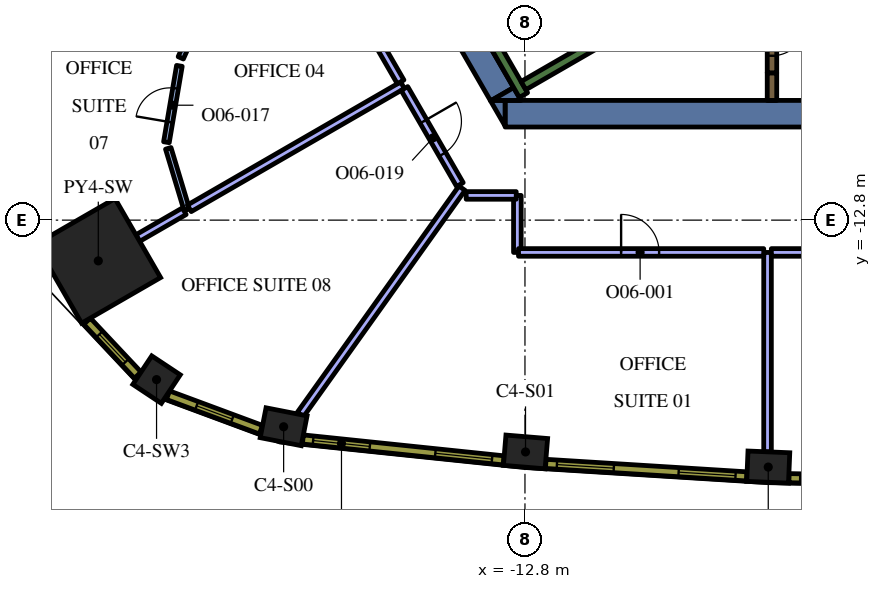
"""IFC4 building model, lengths in metres.
Left out: names, types, materials, properties, quantities, classifications, styles, units other than length and angle.
Written with IfcOpenShell. Run it as: python <this file> out.ifc"""

import sys

from ifc_helpers import new_model, si_unit, direction, frame, frame_2d, origin, origin_2d, place, context, subcontext, project, spatial, polyline, rectangle, outline, extrude, element, fill, save


model = new_model("IFC4")
c1 = context("Model", 3, precision=1e-05, world=origin(), true_north=direction((0.0, 1.0)))
c2 = subcontext(c1, "Body", "Model", "MODEL_VIEW")
j1 = project(units=[si_unit("LENGTHUNIT", "METRE"), si_unit("PLANEANGLEUNIT", "RADIAN")], contexts=[c1])
p1 = place(None, origin())
s1 = spatial("IfcSite", under=j1, at=p1, CompositionType="ELEMENT")
p2 = place(p1, origin())
s2 = spatial("IfcBuilding", under=s1, at=p2, CompositionType="ELEMENT")
p3 = place(p2, frame((0.0, 0.0, 201.6)))
s3 = spatial("IfcBuildingStorey", under=s2, at=p3, CompositionType="ELEMENT", Elevation=201.6)
p4 = place(p3, frame((-24.027, -13.872, 0.0), z_axis=(0.0, 0.0, 1.0), x_axis=(-0.866025403784, -0.5, 0.0)))
e1 = element("IfcColumn", 1, at=p4, inside=s3, PredefinedType="COLUMN", context=c2, shape_type="SweptSolid", body=[
    extrude(rectangle(XDim=2.4, YDim=2.4, at=origin_2d()), origin(), (0.0, 0.0, 1.0), 4.2),
])
for number, where, z_axis, x_axis in (
    (2, (-19.15, -18.237, 0.0), (0.0, 0.0, 1.0), (0.981, -0.192, 0.0)),
    (3, (-12.785, -18.9, 0.0), (0.0, 0.0, 1.0), (0.997, -0.083, 0.0)),
    (4, (-6.398, -19.298, 0.0), (0.0, 0.0, 1.0), (0.999, -0.041, 0.0)),
):
    element("IfcColumn", number, at=place(p3, frame(where, z_axis=z_axis, x_axis=x_axis)), inside=s3, PredefinedType="COLUMN", context=c2, shape_type="SweptSolid", body=[
        extrude(rectangle(XDim=1.1, YDim=0.8, at=origin_2d()), origin(), (0.0, 0.0, 1.0), 4.2),
    ])
p5 = place(p3, frame((-22.494, -16.997, 0.0), z_axis=(0.0, 0.0, 1.0), x_axis=(0.833238868178, -0.552913183563, 0.0)))
e5 = element("IfcColumn", 5, at=p5, inside=s3, PredefinedType="COLUMN", context=c2, shape_type="SweptSolid", body=[
    extrude(rectangle(XDim=0.9, YDim=0.9, at=origin_2d()), origin(), (0.0, 0.0, 1.0), 4.2),
])
p6 = place(p3, frame((8.904, -10.0, 0.0), z_axis=(0.0, 0.0, 1.0), x_axis=(-1.0, 0.0, 0.0)))
e6 = element("IfcWall", 6, at=p6, inside=s3, PredefinedType="SOLIDWALL", context=c2, shape_type="SweptSolid", body=[
    extrude(rectangle(XDim=22.226, YDim=0.7, at=frame_2d((11.113, 0.0))), origin(), (0.0, 0.0, 1.0), 4.2),
])
p7 = place(p3, origin())
e7 = element("IfcWall", 7, at=p7, inside=s3, PredefinedType="SOLIDWALL", context=c2, shape_type="SweptSolid", body=[
    extrude(outline(polyline([(-13.712, -9.65), (-13.324, -9.65), (-13.324, -10.322), (-13.712, -9.65)])), origin(), (0.0, 0.0, 1.0), 4.2),
])
p8 = place(p3, frame((-13.402, -9.487, 0.0), z_axis=(0.0, 0.0, 1.0), x_axis=(-0.500020498207, 0.866013568815, 0.0)))
e8 = element("IfcWall", 8, at=p8, inside=s3, PredefinedType="SOLIDWALL", context=c2, shape_type="SweptSolid", body=[
    extrude(rectangle(XDim=3.829, YDim=0.7, at=frame_2d((1.915, 0.0))), origin(), (0.0, 0.0, 1.0), 4.2),
])
e9 = element("IfcWall", 9, at=p7, inside=s3, PredefinedType="SOLIDWALL", context=c2, shape_type="SweptSolid", body=[
    extrude(outline(polyline([(-12.904, -9.65), (-13.68, -9.65), (-13.098, -9.314), (-12.904, -9.65)])), origin(), (0.0, 0.0, 1.0), 4.2),
])
p9 = place(p3, frame((-12.84, -9.511, 0.0), z_axis=(0.0, 0.0, 1.0), x_axis=(-0.499997733992, 0.866026712061, 0.0)))
e10 = element("IfcWall", 10, at=p9, inside=s3, PredefinedType="SOLIDWALL", context=c2, shape_type="SweptSolid", body=[
    extrude(rectangle(XDim=3.634, YDim=0.25, at=frame_2d((1.817, 0.0))), origin(), (0.0, 0.0, 1.0), 4.2),
])
p10 = place(p3, frame((-12.84, -9.261, 0.0), z_axis=(0.0, 0.0, 1.0), x_axis=(0.866016039709, 0.500016218704, 0.0)))
e11 = element("IfcWall", 11, at=p10, inside=s3, PredefinedType="SOLIDWALL", context=c2, shape_type="SweptSolid", body=[
    extrude(rectangle(XDim=7.05, YDim=0.25, at=frame_2d((3.525, 0.0))), origin(), (0.0, 0.0, 1.0), 4.2),
])
p11 = place(p3, frame((-6.3, -8.925, 0.0), z_axis=(0.0, 0.0, 1.0), x_axis=(0.0, -1.0, 0.0)))
e12 = element("IfcWall", 12, at=p11, inside=s3, PredefinedType="SOLIDWALL", context=c2, shape_type="SweptSolid", body=[
    extrude(rectangle(XDim=0.725, YDim=0.25, at=frame_2d((0.363, 0.0))), origin(), (0.0, 0.0, 1.0), 4.2),
])
p12 = place(p3, frame((-6.3, -7.125, 0.0), z_axis=(0.0, 0.0, 1.0), x_axis=(0.0, -1.0, 0.0)))
e13 = element("IfcWall", 13, at=p12, inside=s3, PredefinedType="SOLIDWALL", context=c2, shape_type="SweptSolid", body=[
    extrude(rectangle(XDim=1.8, YDim=0.25, at=frame_2d((0.9, 0.0))), origin(), (0.0, 0.0, 1.0), 4.2),
])
p13 = place(p12, frame((0.45, 0.0, 0.0)))
e14 = element("IfcOpeningElement", 14, at=p13, cuts=e13, PredefinedType="OPENING", context=c2, shape_type="SweptSolid", body=[
    extrude(rectangle(XDim=0.9, YDim=2.1, at=frame_2d((0.45, 1.05))), frame((0.0, 0.135, 0.0), z_axis=(0.0, -1.0, 0.0), x_axis=(1.0, 0.0, 0.0)), (0.0, 0.0, 1.0), 0.27),
])
p14 = place(p3, frame((-6.417, -13.65, 0.0), z_axis=(0.0, 0.0, 1.0), x_axis=(0.0, -1.0, 0.0)))
e15 = element("IfcWall", 15, at=p14, inside=s3, PredefinedType="PARTITIONING", context=c2, shape_type="SweptSolid", body=[
    extrude(rectangle(XDim=5.247, YDim=0.2, at=frame_2d((2.624, 0.0))), origin(), (0.0, 0.0, 1.0), 3.45),
])
p15 = place(p3, frame((-18.709, -17.916, 0.0), z_axis=(0.0, 0.0, 1.0), x_axis=(0.581023578026, 0.813886725397, 0.0)))
e16 = element("IfcWall", 16, at=p15, inside=s3, PredefinedType="PARTITIONING", context=c2, shape_type="SweptSolid", body=[
    extrude(rectangle(XDim=7.318, YDim=0.2, at=frame_2d((3.659, 0.0))), origin(), (0.0, 0.0, 1.0), 3.45),
])
p16 = place(p3, frame((-13.0, -12.15, 0.0), z_axis=(0.0, 0.0, 1.0), x_axis=(0.0, -1.0, 0.0)))
e17 = element("IfcWall", 17, at=p16, inside=s3, PredefinedType="PARTITIONING", context=c2, shape_type="SweptSolid", body=[
    extrude(rectangle(XDim=1.5, YDim=0.2, at=frame_2d((0.75, 0.0))), origin(), (0.0, 0.0, 1.0), 3.45),
])
p17 = place(p3, frame((-12.97, -13.65, 0.0), z_axis=(0.0, 0.0, 1.0), x_axis=(1.0, 0.0, 0.0)))
e18 = element("IfcWall", 18, at=p17, inside=s3, PredefinedType="PARTITIONING", context=c2, shape_type="SweptSolid", body=[
    extrude(rectangle(XDim=6.453, YDim=0.2, at=frame_2d((3.227, 0.0))), origin(), (0.0, 0.0, 1.0), 3.45),
])
p18 = place(p17, frame((2.7, 0.0, 0.0)))
e19 = element("IfcOpeningElement", 19, at=p18, cuts=e18, PredefinedType="OPENING", context=c2, shape_type="SweptSolid", body=[
    extrude(rectangle(XDim=1.0, YDim=2.1, at=frame_2d((0.5, 1.05))), frame((0.0, 0.11, 0.0), z_axis=(0.0, -1.0, 0.0), x_axis=(1.0, 0.0, 0.0)), (0.0, 0.0, 1.0), 0.22),
])
p19 = place(p3, frame((-14.347, -12.15, 0.0), z_axis=(0.0, 0.0, 1.0), x_axis=(1.0, 0.0, 0.0)))
e20 = element("IfcWall", 20, at=p19, inside=s3, PredefinedType="PARTITIONING", context=c2, shape_type="SweptSolid", body=[
    extrude(rectangle(XDim=1.317, YDim=0.2, at=frame_2d((0.659, 0.0))), origin(), (0.0, 0.0, 1.0), 3.45),
])
p20 = place(p3, frame((-6.317, -13.65, 0.0), z_axis=(0.0, 0.0, 1.0), x_axis=(1.0, 0.0, 0.0)))
e21 = element("IfcWall", 21, at=p20, inside=s3, PredefinedType="PARTITIONING", context=c2, shape_type="SweptSolid", body=[
    extrude(rectangle(XDim=12.634, YDim=0.2, at=frame_2d((6.317, 0.0))), origin(), (0.0, 0.0, 1.0), 3.45),
])
p21 = place(p20, frame((5.8, 0.0, 0.0)))
e22 = element("IfcOpeningElement", 22, at=p21, cuts=e21, PredefinedType="OPENING", context=c2, shape_type="SweptSolid", body=[
    extrude(rectangle(XDim=1.0, YDim=2.1, at=frame_2d((0.5, 1.05))), frame((0.0, 0.11, 0.0), z_axis=(0.0, -1.0, 0.0), x_axis=(1.0, 0.0, 0.0)), (0.0, 0.0, 1.0), 0.22),
])
p22 = place(p3, frame((-21.157, -6.961, 0.0), z_axis=(0.0, 0.0, 1.0), x_axis=(-0.407627569492, -0.913148270869, 0.0)))
e23 = element("IfcWall", 23, at=p22, inside=s3, PredefinedType="PARTITIONING", context=c2, shape_type="SweptSolid", body=[
    extrude(rectangle(XDim=1.718, YDim=0.15, at=frame_2d((0.859, 0.0))), origin(), (0.0, 0.0, 1.0), 3.45),
])
p23 = place(p3, frame((-22.235, -10.75, 0.0), z_axis=(0.0, 0.0, 1.0), x_axis=(0.167623442148, 0.985851095066, 0.0)))
e24 = element("IfcWall", 24, at=p23, inside=s3, PredefinedType="PARTITIONING", context=c2, shape_type="SweptSolid", body=[
    extrude(rectangle(XDim=2.038, YDim=0.15, at=frame_2d((1.019, 0.0))), origin(), (0.0, 0.0, 1.0), 3.45),
])
p24 = place(p23, frame((0.538, 0.0, 0.0)))
e25 = element("IfcOpeningElement", 25, at=p24, cuts=e24, PredefinedType="OPENING", context=c2, shape_type="SweptSolid", body=[
    extrude(rectangle(XDim=0.9, YDim=2.1, at=frame_2d((0.45, 1.05))), frame((0.0, 0.085, 0.0), z_axis=(0.0, -1.0, 0.0), x_axis=(1.0, 0.0, 0.0)), (0.0, 0.0, 1.0), 0.17),
])
p25 = place(p3, frame((-22.186, -10.911, 0.0), z_axis=(0.0, 0.0, 1.0), x_axis=(0.288899576463, -0.957359407286, 0.0)))
e26 = element("IfcWall", 26, at=p25, inside=s3, PredefinedType="PARTITIONING", context=c2, shape_type="SweptSolid", body=[
    extrude(rectangle(XDim=1.688, YDim=0.15, at=frame_2d((0.844, 0.0))), origin(), (0.0, 0.0, 1.0), 3.45),
])
p26 = place(p3, frame((-21.765, -12.566, 0.0), z_axis=(0.0, 0.0, 1.0), x_axis=(-0.866021473228, -0.500006807861, 0.0)))
e27 = element("IfcWall", 27, at=p26, inside=s3, PredefinedType="PARTITIONING", context=c2, shape_type="SweptSolid", body=[
    extrude(rectangle(XDim=1.412, YDim=0.2, at=frame_2d((0.706, 0.0))), origin(), (0.0, 0.0, 1.0), 3.45),
])
p27 = place(p3, frame((-16.021, -9.25, 0.0), z_axis=(0.0, 0.0, 1.0), x_axis=(-0.86601739438, -0.500013872438, 0.0)))
e28 = element("IfcWall", 28, at=p27, inside=s3, PredefinedType="PARTITIONING", context=c2, shape_type="SweptSolid", body=[
    extrude(rectangle(XDim=6.478, YDim=0.2, at=frame_2d((3.239, 0.0))), origin(), (0.0, 0.0, 1.0), 3.45),
])
p28 = place(p3, frame((-17.681, -6.376, 0.0), z_axis=(0.0, 0.0, 1.0), x_axis=(0.500022299258, -0.866012528919, 0.0)))
e29 = element("IfcWall", 29, at=p28, inside=s3, PredefinedType="PARTITIONING", context=c2, shape_type="SweptSolid", body=[
    extrude(rectangle(XDim=3.219, YDim=0.2, at=frame_2d((1.609, 0.0))), origin(), (0.0, 0.0, 1.0), 3.45),
])
p29 = place(p3, frame((-15.971, -9.337, 0.0), z_axis=(0.0, 0.0, 1.0), x_axis=(0.500007233661, -0.866021227388, 0.0)))
e30 = element("IfcWall", 30, at=p29, inside=s3, PredefinedType="PARTITIONING", context=c2, shape_type="SweptSolid", body=[
    extrude(rectangle(XDim=2.919, YDim=0.2, at=frame_2d((1.459, 0.0))), origin(), (0.0, 0.0, 1.0), 3.45),
])
p30 = place(p29, frame((1.0, 0.0, 0.0)))
e31 = element("IfcOpeningElement", 31, at=p30, cuts=e30, PredefinedType="OPENING", context=c2, shape_type="SweptSolid", body=[
    extrude(rectangle(XDim=1.0, YDim=2.1, at=frame_2d((0.5, 1.05))), frame((0.0, 0.11, 0.0), z_axis=(0.0, -1.0, 0.0), x_axis=(1.0, 0.0, 0.0)), (0.0, 0.0, 1.0), 0.22),
])
p31 = place(p3, frame((-18.644, -18.571, 0.0), z_axis=(0.0, 0.0, 1.0), x_axis=(0.994621961215, -0.103571976272, 0.0)))
e32 = element("IfcWall", 32, at=p31, inside=s3, PredefinedType="SOLIDWALL", context=c2, shape_type="SweptSolid", body=[
    extrude(rectangle(XDim=5.311, YDim=0.24, at=frame_2d((2.655, 0.0))), origin(), (0.0, 0.0, 1.0), 3.95),
])
p32 = place(p31, frame((0.271, 0.0, 0.9)))
e33 = element("IfcOpeningElement", 33, at=p32, cuts=e32, PredefinedType="OPENING", context=c2, shape_type="SweptSolid", body=[
    extrude(rectangle(XDim=1.5, YDim=2.55, at=frame_2d((0.75, 1.275))), frame((0.0, 0.13, 0.0), z_axis=(0.0, -1.0, 0.0), x_axis=(1.0, 0.0, 0.0)), (0.0, 0.0, 1.0), 0.26),
])
p33 = place(p31, frame((3.504, 0.0, 0.9)))
e34 = element("IfcOpeningElement", 34, at=p33, cuts=e32, PredefinedType="OPENING", context=c2, shape_type="SweptSolid", body=[
    extrude(rectangle(XDim=1.5, YDim=2.55, at=frame_2d((0.75, 1.275))), frame((0.0, 0.13, 0.0), z_axis=(0.0, -1.0, 0.0), x_axis=(1.0, 0.0, 0.0)), (0.0, 0.0, 1.0), 0.26),
])
p34 = place(p3, frame((-12.253, -19.213, 0.0), z_axis=(0.0, 0.0, 1.0), x_axis=(0.9980633213, -0.062206162685, 0.0)))
e35 = element("IfcWall", 35, at=p34, inside=s3, PredefinedType="SOLIDWALL", context=c2, shape_type="SweptSolid", body=[
    extrude(rectangle(XDim=5.298, YDim=0.24, at=frame_2d((2.649, 0.0))), origin(), (0.0, 0.0, 1.0), 3.95),
])
p35 = place(p34, frame((0.294, 0.0, 0.9)))
e36 = element("IfcOpeningElement", 36, at=p35, cuts=e35, PredefinedType="OPENING", context=c2, shape_type="SweptSolid", body=[
    extrude(rectangle(XDim=1.5, YDim=2.55, at=frame_2d((0.75, 1.275))), frame((0.0, 0.13, 0.0), z_axis=(0.0, -1.0, 0.0), x_axis=(1.0, 0.0, 0.0)), (0.0, 0.0, 1.0), 0.26),
])
p36 = place(p34, frame((3.504, 0.0, 0.9)))
e37 = element("IfcOpeningElement", 37, at=p36, cuts=e35, PredefinedType="OPENING", context=c2, shape_type="SweptSolid", body=[
    extrude(rectangle(XDim=1.5, YDim=2.55, at=frame_2d((0.75, 1.275))), frame((0.0, 0.13, 0.0), z_axis=(0.0, -1.0, 0.0), x_axis=(1.0, 0.0, 0.0)), (0.0, 0.0, 1.0), 0.26),
])
p37 = place(p3, frame((-5.854, -19.589, 0.0), z_axis=(0.0, 0.0, 1.0), x_axis=(0.999784035184, -0.020781794712, 0.0)))
e38 = element("IfcWall", 38, at=p37, inside=s3, PredefinedType="SOLIDWALL", context=c2, shape_type="SweptSolid", body=[
    extrude(rectangle(XDim=5.298, YDim=0.24, at=frame_2d((2.649, 0.0))), origin(), (0.0, 0.0, 1.0), 3.95),
])
p38 = place(p37, frame((0.294, 0.0, 0.9)))
e39 = element("IfcOpeningElement", 39, at=p38, cuts=e38, PredefinedType="OPENING", context=c2, shape_type="SweptSolid", body=[
    extrude(rectangle(XDim=1.5, YDim=2.55, at=frame_2d((0.75, 1.275))), frame((0.0, 0.13, 0.0), z_axis=(0.0, -1.0, 0.0), x_axis=(1.0, 0.0, 0.0)), (0.0, 0.0, 1.0), 0.26),
])
p39 = place(p37, frame((3.504, 0.0, 0.9)))
e40 = element("IfcOpeningElement", 40, at=p39, cuts=e38, PredefinedType="OPENING", context=c2, shape_type="SweptSolid", body=[
    extrude(rectangle(XDim=1.5, YDim=2.55, at=frame_2d((0.75, 1.275))), frame((0.0, 0.13, 0.0), z_axis=(0.0, -1.0, 0.0), x_axis=(1.0, 0.0, 0.0)), (0.0, 0.0, 1.0), 0.26),
])
p40 = place(p3, frame((-24.323, -15.459, 0.0), z_axis=(0.0, 0.0, 1.0), x_axis=(0.684770274166, -0.728758994194, 0.0)))
e41 = element("IfcWall", 41, at=p40, inside=s3, PredefinedType="SOLIDWALL", context=c2, shape_type="SweptSolid", body=[
    extrude(rectangle(XDim=1.948, YDim=0.24, at=frame_2d((0.974, 0.0))), origin(), (0.0, 0.0, 1.0), 3.95),
])
p41 = place(p40, frame((0.474, 0.0, 0.9)))
e42 = element("IfcOpeningElement", 42, at=p41, cuts=e41, PredefinedType="OPENING", context=c2, shape_type="SweptSolid", body=[
    extrude(rectangle(XDim=1.0, YDim=2.55, at=frame_2d((0.5, 1.275))), frame((0.0, 0.13, 0.0), z_axis=(0.0, -1.0, 0.0), x_axis=(1.0, 0.0, 0.0)), (0.0, 0.0, 1.0), 0.26),
])
p42 = place(p3, frame((-22.194, -17.406, 0.0), z_axis=(0.0, 0.0, 1.0), x_axis=(0.937569171184, -0.347798863203, 0.0)))
e43 = element("IfcWall", 43, at=p42, inside=s3, PredefinedType="SOLIDWALL", context=c2, shape_type="SweptSolid", body=[
    extrude(rectangle(XDim=2.609, YDim=0.24, at=frame_2d((1.305, 0.0))), origin(), (0.0, 0.0, 1.0), 3.95),
])
p43 = place(p42, frame((0.805, 0.0, 0.9)))
e44 = element("IfcOpeningElement", 44, at=p43, cuts=e43, PredefinedType="OPENING", context=c2, shape_type="SweptSolid", body=[
    extrude(rectangle(XDim=1.0, YDim=2.55, at=frame_2d((0.5, 1.275))), frame((0.0, 0.13, 0.0), z_axis=(0.0, -1.0, 0.0), x_axis=(1.0, 0.0, 0.0)), (0.0, 0.0, 1.0), 0.26),
])
p44 = place(p13, origin())
e45 = element("IfcDoor", 45, at=p44, inside=s3, OperationType="SINGLE_SWING_LEFT", PredefinedType="DOOR", context=c2, shape_type="SweptSolid", body=[
    extrude(rectangle(XDim=0.9, YDim=2.1, at=frame_2d((0.45, 1.05))), frame((0.0, 0.025, 0.0), z_axis=(0.0, -1.0, 0.0), x_axis=(1.0, 0.0, 0.0)), (0.0, 0.0, 1.0), 0.05),
])
fill(e14, e45)
p45 = place(p18, origin())
e46 = element("IfcDoor", 46, at=p45, inside=s3, OperationType="SINGLE_SWING_LEFT", PredefinedType="DOOR", context=c2, shape_type="SweptSolid", body=[
    extrude(rectangle(XDim=1.0, YDim=2.1, at=frame_2d((0.5, 1.05))), frame((0.0, 0.025, 0.0), z_axis=(0.0, -1.0, 0.0), x_axis=(1.0, 0.0, 0.0)), (0.0, 0.0, 1.0), 0.05),
])
fill(e19, e46)
p46 = place(p24, origin())
e47 = element("IfcDoor", 47, at=p46, inside=s3, OperationType="SINGLE_SWING_LEFT", PredefinedType="DOOR", context=c2, shape_type="SweptSolid", body=[
    extrude(rectangle(XDim=0.9, YDim=2.1, at=frame_2d((0.45, 1.05))), frame((0.0, 0.025, 0.0), z_axis=(0.0, -1.0, 0.0), x_axis=(1.0, 0.0, 0.0)), (0.0, 0.0, 1.0), 0.05),
])
fill(e25, e47)
p47 = place(p30, origin())
e48 = element("IfcDoor", 48, at=p47, inside=s3, OperationType="SINGLE_SWING_RIGHT", PredefinedType="DOOR", context=c2, shape_type="SweptSolid", body=[
    extrude(rectangle(XDim=1.0, YDim=2.1, at=frame_2d((0.5, 1.05))), frame((0.0, 0.025, 0.0), z_axis=(0.0, -1.0, 0.0), x_axis=(1.0, 0.0, 0.0)), (0.0, 0.0, 1.0), 0.05),
])
fill(e31, e48)
p48 = place(p32, origin())
e49 = element("IfcWindow", 49, at=p48, inside=s3, PartitioningType="SINGLE_PANEL", PredefinedType="WINDOW", context=c2, shape_type="SweptSolid", body=[
    extrude(rectangle(XDim=1.5, YDim=2.55, at=frame_2d((0.75, 1.275))), frame((0.0, 0.04, 0.0), z_axis=(0.0, -1.0, 0.0), x_axis=(1.0, 0.0, 0.0)), (0.0, 0.0, 1.0), 0.06),
])
fill(e33, e49)
p49 = place(p33, origin())
e50 = element("IfcWindow", 50, at=p49, inside=s3, PartitioningType="SINGLE_PANEL", PredefinedType="WINDOW", context=c2, shape_type="SweptSolid", body=[
    extrude(rectangle(XDim=1.5, YDim=2.55, at=frame_2d((0.75, 1.275))), frame((0.0, 0.04, 0.0), z_axis=(0.0, -1.0, 0.0), x_axis=(1.0, 0.0, 0.0)), (0.0, 0.0, 1.0), 0.06),
])
fill(e34, e50)
p50 = place(p35, origin())
e51 = element("IfcWindow", 51, at=p50, inside=s3, PartitioningType="SINGLE_PANEL", PredefinedType="WINDOW", context=c2, shape_type="SweptSolid", body=[
    extrude(rectangle(XDim=1.5, YDim=2.55, at=frame_2d((0.75, 1.275))), frame((0.0, 0.04, 0.0), z_axis=(0.0, -1.0, 0.0), x_axis=(1.0, 0.0, 0.0)), (0.0, 0.0, 1.0), 0.06),
])
fill(e36, e51)
p51 = place(p36, origin())
e52 = element("IfcWindow", 52, at=p51, inside=s3, PartitioningType="SINGLE_PANEL", PredefinedType="WINDOW", context=c2, shape_type="SweptSolid", body=[
    extrude(rectangle(XDim=1.5, YDim=2.55, at=frame_2d((0.75, 1.275))), frame((0.0, 0.04, 0.0), z_axis=(0.0, -1.0, 0.0), x_axis=(1.0, 0.0, 0.0)), (0.0, 0.0, 1.0), 0.06),
])
fill(e37, e52)
p52 = place(p38, origin())
e53 = element("IfcWindow", 53, at=p52, inside=s3, PartitioningType="SINGLE_PANEL", PredefinedType="WINDOW", context=c2, shape_type="SweptSolid", body=[
    extrude(rectangle(XDim=1.5, YDim=2.55, at=frame_2d((0.75, 1.275))), frame((0.0, 0.04, 0.0), z_axis=(0.0, -1.0, 0.0), x_axis=(1.0, 0.0, 0.0)), (0.0, 0.0, 1.0), 0.06),
])
fill(e39, e53)
p53 = place(p41, origin())
e54 = element("IfcWindow", 54, at=p53, inside=s3, PartitioningType="SINGLE_PANEL", PredefinedType="WINDOW", context=c2, shape_type="SweptSolid", body=[
    extrude(rectangle(XDim=1.0, YDim=2.55, at=frame_2d((0.5, 1.275))), frame((0.0, 0.04, 0.0), z_axis=(0.0, -1.0, 0.0), x_axis=(1.0, 0.0, 0.0)), (0.0, 0.0, 1.0), 0.06),
])
fill(e42, e54)
p54 = place(p43, origin())
e55 = element("IfcWindow", 55, at=p54, inside=s3, PartitioningType="SINGLE_PANEL", PredefinedType="WINDOW", context=c2, shape_type="SweptSolid", body=[
    extrude(rectangle(XDim=1.0, YDim=2.55, at=frame_2d((0.5, 1.275))), frame((0.0, 0.04, 0.0), z_axis=(0.0, -1.0, 0.0), x_axis=(1.0, 0.0, 0.0)), (0.0, 0.0, 1.0), 0.06),
])
fill(e44, e55)
save(model, sys.argv[1])
